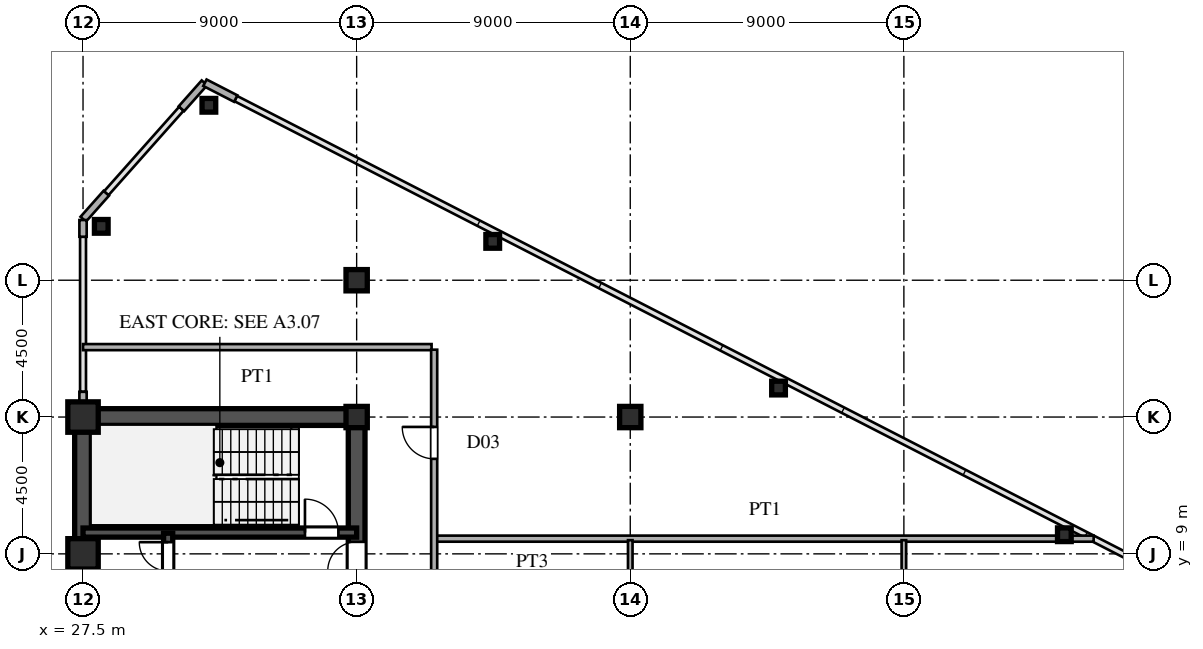
"""IFC4 building model, lengths in metres.
Left out: names, types, materials, properties, quantities, classifications, styles, units other than length and angle.
Written with IfcOpenShell. Run it as: python <this file> out.ifc"""

import sys

from ifc_helpers import new_model, si_unit, direction, frame, frame_2d, origin, origin_2d, place, context, subcontext, project, spatial, rectangle, hollow_rectangle, i_section, extrude, source, transform, mapped, element, fill, save


model = new_model("IFC4")
c1 = context("Model", 3, precision=1e-05, world=origin(), true_north=direction((0.0, 1.0)))
c2 = subcontext(c1, "Body", "Model", "MODEL_VIEW")
j1 = project(units=[si_unit("LENGTHUNIT", "METRE"), si_unit("PLANEANGLEUNIT", "RADIAN")], contexts=[c1])
p1 = place(None, origin())
s1 = spatial("IfcSite", under=j1, at=p1, CompositionType="ELEMENT")
p2 = place(p1, origin())
s2 = spatial("IfcBuilding", under=s1, at=p2, CompositionType="ELEMENT")
p3 = place(p2, frame((0.0, 0.0, 147.6)))
s3 = spatial("IfcBuildingStorey", under=s2, at=p3, CompositionType="ELEMENT", Elevation=147.6)
m1 = source(origin(), c2, "Body", "SweptSolid", [
    extrude(hollow_rectangle(XDim=1.0, YDim=1.0, WallThickness=0.042, at=origin_2d()), origin(), (0.0, 0.0, 1.0), 3.6),
])
for number, where, z_axis, x_axis in (
    (1, (27.5, 9.0, 0.0), (0.0, 0.0, 1.0), (1.0, 0.0, 0.0)),
    (2, (27.5, 13.5, 0.0), (0.0, 0.0, 1.0), (1.0, 0.0, 0.0)),
):
    element("IfcColumn", number, at=place(p3, frame(where, z_axis=z_axis, x_axis=x_axis)), inside=s3, PredefinedType="COLUMN", context=c2, shape_type="MappedRepresentation", body=[
        mapped(m1, transform((0.0, 0.0, 0.0), scale=1.0)),
    ])
m2 = source(origin(), c2, "Body", "SweptSolid", [
    extrude(i_section(OverallWidth=0.7, OverallDepth=0.7, WebThickness=0.028, FlangeThickness=0.045, at=origin_2d()), origin(), (0.0, 0.0, 1.0), 3.6),
])
for number, where, z_axis, x_axis in (
    (3, (36.5, 13.5, 0.0), (0.0, 0.0, 1.0), (1.0, 0.0, 0.0)),
    (4, (36.5, 18.0, 0.0), (0.0, 0.0, 1.0), (1.0, 0.0, 0.0)),
    (5, (45.5, 13.5, 0.0), (0.0, 0.0, 1.0), (1.0, 0.0, 0.0)),
):
    element("IfcColumn", number, at=place(p3, frame(where, z_axis=z_axis, x_axis=x_axis)), inside=s3, PredefinedType="COLUMN", context=c2, shape_type="MappedRepresentation", body=[
        mapped(m2, transform((0.0, 0.0, 0.0), scale=1.0)),
    ])
m3 = source(origin(), c2, "Body", "SweptSolid", [
    extrude(hollow_rectangle(XDim=0.45, YDim=0.45, WallThickness=0.018, at=origin_2d()), origin(), (0.0, 0.0, 1.0), 3.6),
])
for number, where, z_axis, x_axis in (
    (6, (31.64, 23.754, 0.0), (0.0, 0.0, 1.0), (1.0, 0.0, 0.0)),
    (7, (28.1, 19.772, 0.0), (0.0, 0.0, 1.0), (1.0, 0.0, 0.0)),
    (8, (40.976, 19.278, 0.0), (0.0, 0.0, 1.0), (1.0, 0.0, 0.0)),
    (9, (50.377, 14.453, 0.0), (0.0, 0.0, 1.0), (1.0, 0.0, 0.0)),
    (10, (59.779, 9.629, 0.0), (0.0, 0.0, 1.0), (1.0, 0.0, 0.0)),
):
    element("IfcColumn", number, at=place(p3, frame(where, z_axis=z_axis, x_axis=x_axis)), inside=s3, PredefinedType="COLUMN", context=c2, shape_type="MappedRepresentation", body=[
        mapped(m3, transform((0.0, 0.0, 0.0), scale=1.0)),
    ])
p4 = place(p3, frame((32.523, 23.975, 0.0), z_axis=(0.0, 0.0, 1.0), x_axis=(-0.889797395748, 0.456355776255, 0.0)))
e11 = element("IfcWall", 11, at=p4, inside=s3, PredefinedType="SOLIDWALL", context=c2, shape_type="SweptSolid", body=[
    extrude(rectangle(XDim=1.14, YDim=0.24, at=frame_2d((0.57, 0.0))), origin(), (0.0, 0.0, 1.0), 3.38),
])
for number, where, z_axis, x_axis in (
    (12, (31.493, 24.492, 0.0), (0.0, 0.0, 1.0), (-0.664, -0.747, 0.0)),
    (13, (28.264, 20.86, 0.0), (0.0, 0.0, 1.0), (-0.664, -0.747, 0.0)),
):
    element("IfcWall", number, at=place(p3, frame(where, z_axis=z_axis, x_axis=x_axis)), inside=s3, PredefinedType="SOLIDWALL", context=c2, shape_type="SweptSolid", body=[
        extrude(rectangle(XDim=1.14, YDim=0.24, at=frame_2d((0.57, 0.0))), origin(), (0.0, 0.0, 1.0), 3.38),
    ])
p5 = place(p3, frame((27.5, 13.78, 0.0), z_axis=(0.0, 0.0, 1.0), x_axis=(0.0, 1.0, 0.0)))
e14 = element("IfcWall", 14, at=p5, inside=s3, PredefinedType="SOLIDWALL", context=c2, shape_type="SweptSolid", body=[
    extrude(rectangle(XDim=0.55, YDim=0.24, at=frame_2d((0.275, 0.0))), origin(), (0.0, 0.0, 1.0), 2.88),
])
p6 = place(p3, frame((27.5, 19.43, 0.0), z_axis=(0.0, 0.0, 1.0), x_axis=(0.0, 1.0, 0.0)))
e15 = element("IfcWall", 15, at=p6, inside=s3, PredefinedType="SOLIDWALL", context=c2, shape_type="SweptSolid", body=[
    extrude(rectangle(XDim=0.55, YDim=0.24, at=frame_2d((0.275, 0.0))), origin(), (0.0, 0.0, 1.0), 3.38),
])
p7 = place(p3, frame((27.5, 1.3, 0.0), z_axis=(0.0, 0.0, 1.0), x_axis=(0.0, 1.0, 0.0)))
e16 = element("IfcWall", 16, at=p7, inside=s3, PredefinedType="SHEAR", context=c2, shape_type="SweptSolid", body=[
    extrude(rectangle(XDim=12.2, YDim=0.55, at=frame_2d((6.1, 0.0))), origin(), (0.0, 0.0, 1.0), 3.38),
])
p8 = place(p3, frame((27.5, 13.5, 0.0), z_axis=(0.0, 0.0, 1.0), x_axis=(1.0, 0.0, 0.0)))
e17 = element("IfcWall", 17, at=p8, inside=s3, PredefinedType="SHEAR", context=c2, shape_type="SweptSolid", body=[
    extrude(rectangle(XDim=9.0, YDim=0.55, at=frame_2d((4.5, 0.0))), origin(), (0.0, 0.0, 1.0), 3.38),
])
p9 = place(p3, frame((36.5, 8.2, 0.0), z_axis=(0.0, 0.0, 1.0), x_axis=(0.0, 1.0, 0.0)))
e18 = element("IfcWall", 18, at=p9, inside=s3, PredefinedType="SHEAR", context=c2, shape_type="SweptSolid", body=[
    extrude(rectangle(XDim=5.45, YDim=0.55, at=frame_2d((2.725, 0.0))), origin(), (0.0, 0.0, 1.0), 3.38),
])
p10 = place(p9, frame((0.245, 0.0, 0.0)))
e19 = element("IfcOpeningElement", 19, at=p10, cuts=e18, PredefinedType="OPENING", context=c2, shape_type="SweptSolid", body=[
    extrude(rectangle(XDim=0.95, YDim=2.15, at=frame_2d((0.475, 1.075))), frame((0.0, 0.285, 0.0), z_axis=(0.0, -1.0, 0.0), x_axis=(1.0, 0.0, 0.0)), (0.0, 0.0, 1.0), 0.57),
])
p11 = place(p3, frame((27.5, 9.7, 0.0), z_axis=(0.0, 0.0, 1.0), x_axis=(1.0, 0.0, 0.0)))
e20 = element("IfcWall", 20, at=p11, inside=s3, PredefinedType="SHEAR", context=c2, shape_type="SweptSolid", body=[
    extrude(rectangle(XDim=9.0, YDim=0.3, at=frame_2d((4.5, 0.0))), origin(), (0.0, 0.0, 1.0), 3.38),
])
p12 = place(p11, frame((7.3, 0.0, 0.0)))
e21 = element("IfcOpeningElement", 21, at=p12, cuts=e20, PredefinedType="OPENING", context=c2, shape_type="SweptSolid", body=[
    extrude(rectangle(XDim=1.1, YDim=2.2, at=frame_2d((0.55, 1.1))), frame((0.0, 0.16, 0.0), z_axis=(0.0, -1.0, 0.0), x_axis=(1.0, 0.0, 0.0)), (0.0, 0.0, 1.0), 0.32),
])
p13 = place(p3, frame((30.3, 8.15, 0.0), z_axis=(0.0, 0.0, 1.0), x_axis=(0.0, 1.0, 0.0)))
e22 = element("IfcWall", 22, at=p13, inside=s3, PredefinedType="SHEAR", context=c2, shape_type="SweptSolid", body=[
    extrude(rectangle(XDim=1.53, YDim=0.3, at=frame_2d((0.765, 0.0))), origin(), (0.0, 0.0, 1.0), 3.38),
])
p14 = place(p13, frame((0.285, 0.0, 0.0)))
e23 = element("IfcOpeningElement", 23, at=p14, cuts=e22, PredefinedType="OPENING", context=c2, shape_type="SweptSolid", body=[
    extrude(rectangle(XDim=0.95, YDim=2.15, at=frame_2d((0.475, 1.075))), frame((0.0, 0.16, 0.0), z_axis=(0.0, -1.0, 0.0), x_axis=(1.0, 0.0, 0.0)), (0.0, 0.0, 1.0), 0.32),
])
p15 = place(p3, frame((39.13, 9.5, 0.0), z_axis=(0.0, 0.0, 1.0), x_axis=(1.0, 0.0, 0.0)))
e24 = element("IfcWall", 24, at=p15, inside=s3, PredefinedType="PARTITIONING", context=c2, shape_type="SweptSolid", body=[
    extrude(rectangle(XDim=21.612, YDim=0.2, at=frame_2d((10.806, 0.0))), origin(), (0.0, 0.0, 1.0), 3.38),
])
p16 = place(p3, frame((27.5, 15.8, 0.0), z_axis=(0.0, 0.0, 1.0), x_axis=(1.0, 0.0, 0.0)))
e25 = element("IfcWall", 25, at=p16, inside=s3, PredefinedType="PARTITIONING", context=c2, shape_type="SweptSolid", body=[
    extrude(rectangle(XDim=11.465, YDim=0.2, at=frame_2d((5.732, 0.0))), origin(), (0.0, 0.0, 1.0), 3.38),
])
p17 = place(p3, frame((39.05, -15.715, 0.0), z_axis=(0.0, 0.0, 1.0), x_axis=(0.0, 1.0, 0.0)))
e26 = element("IfcWall", 26, at=p17, inside=s3, PredefinedType="PARTITIONING", context=c2, shape_type="SweptSolid", body=[
    extrude(rectangle(XDim=31.43, YDim=0.2, at=frame_2d((15.715, 0.0))), origin(), (0.0, 0.0, 1.0), 3.38),
])
p18 = place(p17, frame((1.54, 0.0, 0.0)))
e27 = element("IfcOpeningElement", 27, at=p18, cuts=e26, PredefinedType="OPENING", context=c2, shape_type="SweptSolid", body=[
    extrude(rectangle(XDim=1.05, YDim=2.25, at=frame_2d((0.525, 1.125))), frame((0.0, 0.11, 0.0), z_axis=(0.0, -1.0, 0.0), x_axis=(1.0, 0.0, 0.0)), (0.0, 0.0, 1.0), 0.22),
])
p19 = place(p17, frame((8.782, 0.0, 0.0)))
e28 = element("IfcOpeningElement", 28, at=p19, cuts=e26, PredefinedType="OPENING", context=c2, shape_type="SweptSolid", body=[
    extrude(rectangle(XDim=1.05, YDim=2.25, at=frame_2d((0.525, 1.125))), frame((0.0, 0.11, 0.0), z_axis=(0.0, -1.0, 0.0), x_axis=(1.0, 0.0, 0.0)), (0.0, 0.0, 1.0), 0.22),
])
p20 = place(p17, frame((19.282, 0.0, 0.0)))
e29 = element("IfcOpeningElement", 29, at=p20, cuts=e26, PredefinedType="OPENING", context=c2, shape_type="SweptSolid", body=[
    extrude(rectangle(XDim=1.05, YDim=2.25, at=frame_2d((0.525, 1.125))), frame((0.0, 0.11, 0.0), z_axis=(0.0, -1.0, 0.0), x_axis=(1.0, 0.0, 0.0)), (0.0, 0.0, 1.0), 0.22),
])
p21 = place(p17, frame((27.84, 0.0, 0.0)))
e30 = element("IfcOpeningElement", 30, at=p21, cuts=e26, PredefinedType="OPENING", context=c2, shape_type="SweptSolid", body=[
    extrude(rectangle(XDim=1.05, YDim=2.25, at=frame_2d((0.525, 1.125))), frame((0.0, 0.11, 0.0), z_axis=(0.0, -1.0, 0.0), x_axis=(1.0, 0.0, 0.0)), (0.0, 0.0, 1.0), 0.22),
])
p22 = place(p3, frame((45.5, 6.402, 0.0), z_axis=(0.0, 0.0, 1.0), x_axis=(0.0, 1.0, 0.0)))
e31 = element("IfcWall", 31, at=p22, inside=s3, PredefinedType="PARTITIONING", context=c2, shape_type="SweptSolid", body=[
    extrude(rectangle(XDim=3.048, YDim=0.15, at=frame_2d((1.524, 0.0))), origin(), (0.0, 0.0, 1.0), 2.78),
])
p23 = place(p3, frame((54.5, -11.45, 0.0), z_axis=(0.0, 0.0, 1.0), x_axis=(0.0, 1.0, 0.0)))
e32 = element("IfcWall", 32, at=p23, inside=s3, PredefinedType="PARTITIONING", context=c2, shape_type="SweptSolid", body=[
    extrude(rectangle(XDim=20.9, YDim=0.15, at=frame_2d((10.45, 0.0))), origin(), (0.0, 0.0, 1.0), 2.78),
])
p24 = place(p23, frame((4.725, 0.0, 0.0)))
e33 = element("IfcOpeningElement", 33, at=p24, cuts=e32, PredefinedType="OPENING", context=c2, shape_type="SweptSolid", body=[
    extrude(rectangle(XDim=0.95, YDim=2.15, at=frame_2d((0.475, 1.075))), frame((0.0, 0.085, 0.0), z_axis=(0.0, -1.0, 0.0), x_axis=(1.0, 0.0, 0.0)), (0.0, 0.0, 1.0), 0.17),
])
p25 = place(p23, frame((1.225, 0.0, 0.0)))
e34 = element("IfcOpeningElement", 34, at=p25, cuts=e32, PredefinedType="OPENING", context=c2, shape_type="SweptSolid", body=[
    extrude(rectangle(XDim=0.95, YDim=2.15, at=frame_2d((0.475, 1.075))), frame((0.0, 0.085, 0.0), z_axis=(0.0, -1.0, 0.0), x_axis=(1.0, 0.0, 0.0)), (0.0, 0.0, 1.0), 0.17),
])
p26 = place(p23, frame((8.225, 0.0, 0.0)))
e35 = element("IfcOpeningElement", 35, at=p26, cuts=e32, PredefinedType="OPENING", context=c2, shape_type="SweptSolid", body=[
    extrude(rectangle(XDim=0.95, YDim=2.15, at=frame_2d((0.475, 1.075))), frame((0.0, 0.085, 0.0), z_axis=(0.0, -1.0, 0.0), x_axis=(1.0, 0.0, 0.0)), (0.0, 0.0, 1.0), 0.17),
])
p27 = place(p23, frame((14.552, 0.0, 0.0)))
e36 = element("IfcOpeningElement", 36, at=p27, cuts=e32, PredefinedType="OPENING", context=c2, shape_type="SweptSolid", body=[
    extrude(rectangle(XDim=0.95, YDim=2.15, at=frame_2d((0.475, 1.075))), frame((0.0, 0.085, 0.0), z_axis=(0.0, -1.0, 0.0), x_axis=(1.0, 0.0, 0.0)), (0.0, 0.0, 1.0), 0.17),
])
m4 = source(origin(), c2, "Body", "SweptSolid", [
    extrude(rectangle(XDim=0.95, YDim=2.15, at=frame_2d((0.475, 1.075))), frame((0.0, 0.025, 0.0), z_axis=(0.0, -1.0, 0.0), x_axis=(1.0, 0.0, 0.0)), (0.0, 0.0, 1.0), 0.05),
])
p28 = place(p10, origin())
e37 = element("IfcDoor", 37, at=p28, inside=s3, OperationType="SINGLE_SWING_LEFT", PredefinedType="DOOR", context=c2, shape_type="MappedRepresentation", body=[
    mapped(m4, transform((0.0, 0.0, 0.0), scale=1.0)),
])
fill(e19, e37)
m5 = source(origin(), c2, "Body", "SweptSolid", [
    extrude(rectangle(XDim=1.1, YDim=2.2, at=frame_2d((0.55, 1.1))), frame((0.0, 0.025, 0.0), z_axis=(0.0, -1.0, 0.0), x_axis=(1.0, 0.0, 0.0)), (0.0, 0.0, 1.0), 0.05),
])
p29 = place(p12, origin())
e38 = element("IfcDoor", 38, at=p29, inside=s3, OperationType="SINGLE_SWING_LEFT", PredefinedType="DOOR", context=c2, shape_type="MappedRepresentation", body=[
    mapped(m5, transform((0.0, 0.0, 0.0), scale=1.0)),
])
fill(e21, e38)
p30 = place(p14, origin())
e39 = element("IfcDoor", 39, at=p30, inside=s3, OperationType="SINGLE_SWING_RIGHT", PredefinedType="DOOR", context=c2, shape_type="MappedRepresentation", body=[
    mapped(m4, transform((0.0, 0.0, 0.0), scale=1.0)),
])
fill(e23, e39)
m6 = source(origin(), c2, "Body", "SweptSolid", [
    extrude(rectangle(XDim=1.05, YDim=2.25, at=frame_2d((0.525, 1.125))), frame((0.0, 0.025, 0.0), z_axis=(0.0, -1.0, 0.0), x_axis=(1.0, 0.0, 0.0)), (0.0, 0.0, 1.0), 0.05),
])
p31 = place(p21, origin())
e40 = element("IfcDoor", 40, at=p31, inside=s3, OperationType="SINGLE_SWING_RIGHT", PredefinedType="DOOR", context=c2, shape_type="MappedRepresentation", body=[
    mapped(m6, transform((0.0, 0.0, 0.0), scale=1.0)),
])
fill(e30, e40)
save(model, sys.argv[1])
